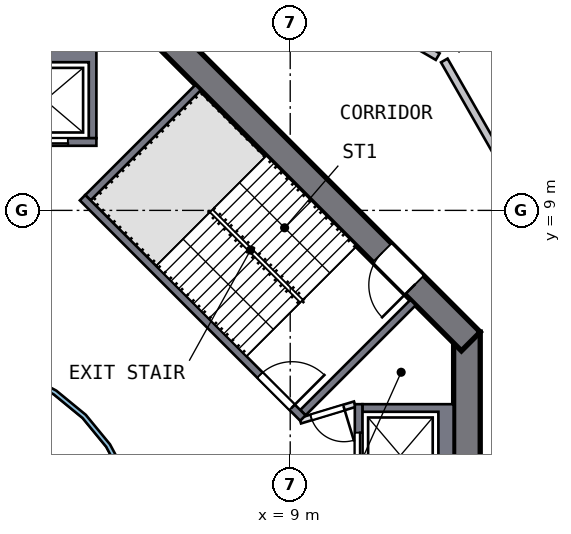
"""IFC4 building model, lengths in metres.
Left out: names, types, materials, properties, quantities, classifications, styles, units other than length and angle.
Written with IfcOpenShell. Run it as: python <this file> out.ifc"""

import sys

from ifc_helpers import new_model, si_unit, direction, frame, frame_2d, origin, place, context, subcontext, project, spatial, polyline, rectangle, outline, extrude, element, fill, save


model = new_model("IFC4")
c1 = context("Model", 3, precision=1e-05, world=origin(), true_north=direction((0.0, 1.0)))
c2 = subcontext(c1, "Body", "Model", "MODEL_VIEW")
j1 = project(units=[si_unit("LENGTHUNIT", "METRE"), si_unit("PLANEANGLEUNIT", "RADIAN")], contexts=[c1])
p1 = place(None, origin())
s1 = spatial("IfcSite", under=j1, at=p1, CompositionType="ELEMENT")
p2 = place(p1, origin())
s2 = spatial("IfcBuilding", under=s1, at=p2, CompositionType="ELEMENT")
p3 = place(p2, frame((0.0, 0.0, 154.0)))
s3 = spatial("IfcBuildingStorey", under=s2, at=p3, CompositionType="ELEMENT", Elevation=154.0)
p4 = place(p3, frame((13.65, -5.799, 0.0), z_axis=(0.0, 0.0, 1.0), x_axis=(0.0, 1.0, 0.0)))
e1 = element("IfcWall", 1, at=p4, inside=s3, PredefinedType="SHEAR", context=c2, shape_type="SweptSolid", body=[
    extrude(rectangle(XDim=11.598, YDim=0.7, at=frame_2d((5.799, 0.0))), origin(), (0.0, 0.0, 1.0), 4.5),
])
p5 = place(p4, frame((4.899, 0.0, 0.0)))
e2 = element("IfcOpeningElement", 2, at=p5, cuts=e1, PredefinedType="OPENING", context=c2, shape_type="SweptSolid", body=[
    extrude(rectangle(XDim=1.8, YDim=2.1, at=frame_2d((0.9, 1.05))), frame((0.0, 0.36, 0.0), z_axis=(0.0, -1.0, 0.0), x_axis=(1.0, 0.0, 0.0)), (0.0, 0.0, 1.0), 0.72),
])
p6 = place(p3, frame((13.752, 5.552, 0.0), z_axis=(0.0, 0.0, 1.0), x_axis=(-0.707106781, 0.707106781, 0.0)))
e3 = element("IfcWall", 3, at=p6, inside=s3, PredefinedType="SHEAR", context=c2, shape_type="SweptSolid", body=[
    extrude(rectangle(XDim=11.598, YDim=0.7, at=frame_2d((5.799, 0.0))), origin(), (0.0, 0.0, 1.0), 4.5),
])
p7 = place(p6, frame((2.099, 0.0, 0.0)))
e4 = element("IfcOpeningElement", 4, at=p7, cuts=e3, PredefinedType="OPENING", context=c2, shape_type="SweptSolid", body=[
    extrude(rectangle(XDim=1.2, YDim=2.1, at=frame_2d((0.6, 1.05))), frame((0.0, 0.36, 0.0), z_axis=(0.0, -1.0, 0.0), x_axis=(1.0, 0.0, 0.0)), (0.0, 0.0, 1.0), 0.72),
])
p8 = place(p3, origin())
e5 = element("IfcWall", 5, at=p8, inside=s3, PredefinedType="SOLIDWALL", context=c2, shape_type="SweptSolid", body=[
    extrude(outline(polyline([(13.3, 3.9), (13.3, 1.2), (10.9, 1.2), (10.9, 1.4), (12.9, 1.4), (12.9, 3.7), (10.9, 3.7), (10.9, 3.9), (13.3, 3.9)])), origin(), (0.0, 0.0, 1.0), 4.19),
])
p9 = place(p3, frame((10.8, 1.2, 0.0), z_axis=(0.0, 0.0, 1.0), x_axis=(0.0, 1.0, 0.0)))
e6 = element("IfcWall", 6, at=p9, inside=s3, PredefinedType="SOLIDWALL", context=c2, shape_type="SweptSolid", body=[
    extrude(rectangle(XDim=2.7, YDim=0.2, at=frame_2d((1.35, 0.0))), origin(), (0.0, 0.0, 1.0), 4.19),
])
p10 = place(p9, frame((0.75, 0.0, 0.0)))
e7 = element("IfcOpeningElement", 7, at=p10, cuts=e6, PredefinedType="OPENING", context=c2, shape_type="SweptSolid", body=[
    extrude(rectangle(XDim=1.2, YDim=2.1, at=frame_2d((0.6, 1.05))), frame((0.0, 0.11, 0.0), z_axis=(0.0, -1.0, 0.0), x_axis=(1.0, 0.0, 0.0)), (0.0, 0.0, 1.0), 0.22),
])
p11 = place(p3, origin())
e8 = element("IfcWall", 8, at=p11, inside=s3, PredefinedType="SOLIDWALL", context=c2, shape_type="SweptSolid", body=[
    extrude(outline(polyline([(3.9, 13.3), (3.9, 10.9), (3.7, 10.9), (3.7, 12.9), (1.4, 12.9), (1.4, 10.9), (1.2, 10.9), (1.2, 13.3), (3.9, 13.3)])), origin(), (0.0, 0.0, 1.0), 4.19),
])
p12 = place(p3, frame((1.2, 10.8, 0.0), z_axis=(0.0, 0.0, 1.0), x_axis=(1.0, 0.0, 0.0)))
e9 = element("IfcWall", 9, at=p12, inside=s3, PredefinedType="SOLIDWALL", context=c2, shape_type="SweptSolid", body=[
    extrude(rectangle(XDim=2.7, YDim=0.2, at=frame_2d((1.35, 0.0))), origin(), (0.0, 0.0, 1.0), 4.19),
])
p13 = place(p12, frame((0.75, 0.0, 0.0)))
e10 = element("IfcOpeningElement", 10, at=p13, cuts=e9, PredefinedType="OPENING", context=c2, shape_type="SweptSolid", body=[
    extrude(rectangle(XDim=1.2, YDim=2.1, at=frame_2d((0.6, 1.05))), frame((0.0, 0.11, 0.0), z_axis=(0.0, -1.0, 0.0), x_axis=(1.0, 0.0, 0.0)), (0.0, 0.0, 1.0), 0.22),
])
p14 = place(p3, frame((3.535, 9.334, 0.0), z_axis=(0.0, 0.0, 1.0), x_axis=(0.707106781, -0.707106781, 0.0)))
e11 = element("IfcWall", 11, at=p14, inside=s3, PredefinedType="SOLIDWALL", context=c2, shape_type="SweptSolid", body=[
    extrude(rectangle(XDim=8.2, YDim=0.2, at=frame_2d((4.1, 0.0))), origin(), (0.0, 0.0, 1.0), 4.19),
])
p15 = place(p14, frame((6.6, 0.0, 0.0)))
e12 = element("IfcOpeningElement", 12, at=p15, cuts=e11, PredefinedType="OPENING", context=c2, shape_type="SweptSolid", body=[
    extrude(rectangle(XDim=1.2, YDim=2.1, at=frame_2d((0.6, 1.05))), frame((0.0, 0.11, 0.0), z_axis=(0.0, -1.0, 0.0), x_axis=(1.0, 0.0, 0.0)), (0.0, 0.0, 1.0), 0.22),
])
for number, where, z_axis, x_axis in (
    (13, (9.334, 3.677, 0.0), (0.0, 0.0, 1.0), (0.707, 0.707, 0.0)),
    (14, (3.677, 9.334, 0.0), (0.0, 0.0, 1.0), (0.707, 0.707, 0.0)),
):
    element("IfcWall", number, at=place(p3, frame(where, z_axis=z_axis, x_axis=x_axis)), inside=s3, PredefinedType="SOLIDWALL", context=c2, shape_type="SweptSolid", body=[
        extrude(rectangle(XDim=4.1, YDim=0.2, at=frame_2d((2.05, 0.0))), origin(), (0.0, 0.0, 1.0), 4.19),
    ])
p16 = place(p3, frame((10.7, 3.9, 0.0), z_axis=(0.0, 0.0, 1.0), x_axis=(-0.957084567, -0.289808785, 0.0)))
e15 = element("IfcWall", 15, at=p16, inside=s3, PredefinedType="PARTITIONING", context=c2, shape_type="SweptSolid", body=[
    extrude(rectangle(XDim=1.501, YDim=0.15, at=frame_2d((0.75, 0.0))), origin(), (0.0, 0.0, 1.0), 4.19),
])
p17 = place(p16, frame((0.301, 0.0, 0.0)))
e16 = element("IfcOpeningElement", 16, at=p17, cuts=e15, PredefinedType="OPENING", context=c2, shape_type="SweptSolid", body=[
    extrude(rectangle(XDim=0.9, YDim=2.1, at=frame_2d((0.45, 1.05))), frame((0.0, 0.085, 0.0), z_axis=(0.0, -1.0, 0.0), x_axis=(1.0, 0.0, 0.0)), (0.0, 0.0, 1.0), 0.17),
])
p18 = place(p3, origin())
e17 = element("IfcWall", 17, at=p18, inside=s3, PredefinedType="SOLIDWALL", context=c2, shape_type="SweptSolid", body=[
    extrude(outline(polyline([(5.021, -0.999), (4.73, -1.959), (4.257, -2.844), (3.62, -3.62), (2.844, -4.257), (1.959, -4.73), (0.999, -5.021), (0.0, -5.12), (-0.999, -5.021), (-1.959, -4.73), (-2.844, -4.257), (-3.62, -3.62), (-4.257, -2.844), (-4.73, -1.959), (-5.021, -0.999), (-5.12, 0.0), (-5.021, 0.999), (-4.73, 1.959), (-4.257, 2.844), (-3.62, 3.62), (-2.844, 4.257), (-1.959, 4.73), (-0.999, 5.021), (0.0, 5.12), (0.999, 5.021), (1.959, 4.73), (2.844, 4.257), (3.62, 3.62), (4.257, 2.844), (4.73, 1.959), (5.021, 0.999), (5.12, 0.0), (5.021, -0.999)]), holes=[polyline([(4.904, 0.976), (4.619, 1.913), (4.157, 2.778), (3.535, 3.535), (2.778, 4.157), (1.913, 4.619), (0.976, 4.904), (0.0, 5.0), (-0.976, 4.904), (-1.913, 4.619), (-2.778, 4.157), (-3.535, 3.535), (-4.157, 2.778), (-4.619, 1.913), (-4.904, 0.976), (-5.0, 0.0), (-4.904, -0.976), (-4.619, -1.913), (-4.157, -2.778), (-3.535, -3.535), (-2.778, -4.157), (-1.913, -4.619), (-0.976, -4.904), (0.0, -5.0), (0.976, -4.904), (1.913, -4.619), (2.778, -4.157), (3.535, -3.535), (4.157, -2.778), (4.619, -1.913), (4.904, -0.976), (5.0, 0.0), (4.904, 0.976)])]), origin(), (0.0, 0.0, 1.0), 4.19),
])
p19 = place(p3, frame((4.833, 17.738, 0.0), z_axis=(0.0, 0.0, 1.0), x_axis=(0.863919531, -0.503629868, 0.0)))
e18 = element("IfcWall", 18, at=p19, inside=s3, PredefinedType="SOLIDWALL", context=c2, shape_type="SweptSolid", body=[
    extrude(rectangle(XDim=9.317, YDim=0.2, at=frame_2d((4.658, 0.0))), origin(), (0.0, 0.0, 1.0), 4.19),
])
p20 = place(p19, frame((5.15, 0.0, 0.0)))
e19 = element("IfcOpeningElement", 19, at=p20, cuts=e18, PredefinedType="OPENING", context=c2, shape_type="SweptSolid", body=[
    extrude(rectangle(XDim=1.0, YDim=2.1, at=frame_2d((0.5, 1.05))), frame((0.0, 0.11, 0.0), z_axis=(0.0, -1.0, 0.0), x_axis=(1.0, 0.0, 0.0)), (0.0, 0.0, 1.0), 0.22),
])
p21 = place(p3, frame((13.054, 12.945, 0.0), z_axis=(0.0, 0.0, 1.0), x_axis=(0.496359944, -0.868116816, 0.0)))
e20 = element("IfcWall", 20, at=p21, inside=s3, PredefinedType="SOLIDWALL", context=c2, shape_type="SweptSolid", body=[
    extrude(rectangle(XDim=9.517, YDim=0.2, at=frame_2d((4.758, 0.0))), origin(), (0.0, 0.0, 1.0), 4.19),
])
p22 = place(p21, frame((6.25, 0.0, 0.0)))
e21 = element("IfcOpeningElement", 21, at=p22, cuts=e20, PredefinedType="OPENING", context=c2, shape_type="SweptSolid", body=[
    extrude(rectangle(XDim=1.8, YDim=2.1, at=frame_2d((0.9, 1.05))), frame((0.0, 0.11, 0.0), z_axis=(0.0, -1.0, 0.0), x_axis=(1.0, 0.0, 0.0)), (0.0, 0.0, 1.0), 0.22),
])
p23 = place(p10, origin())
e22 = element("IfcDoor", 22, at=p23, inside=s3, OperationType="DOUBLE_DOOR_SLIDING", PredefinedType="DOOR", context=c2, shape_type="SweptSolid", body=[
    extrude(rectangle(XDim=1.2, YDim=2.1, at=frame_2d((0.6, 1.05))), frame((0.0, 0.025, 0.0), z_axis=(0.0, -1.0, 0.0), x_axis=(1.0, 0.0, 0.0)), (0.0, 0.0, 1.0), 0.05),
])
fill(e7, e22)
p24 = place(p13, origin())
e23 = element("IfcDoor", 23, at=p24, inside=s3, OperationType="DOUBLE_DOOR_SLIDING", PredefinedType="DOOR", context=c2, shape_type="SweptSolid", body=[
    extrude(rectangle(XDim=1.2, YDim=2.1, at=frame_2d((0.6, 1.05))), frame((0.0, 0.025, 0.0), z_axis=(0.0, -1.0, 0.0), x_axis=(1.0, 0.0, 0.0)), (0.0, 0.0, 1.0), 0.05),
])
fill(e10, e23)
p25 = place(p15, origin())
e24 = element("IfcDoor", 24, at=p25, inside=s3, OperationType="SINGLE_SWING_RIGHT", PredefinedType="DOOR", context=c2, shape_type="SweptSolid", body=[
    extrude(rectangle(XDim=1.2, YDim=2.1, at=frame_2d((0.6, 1.05))), frame((0.0, 0.025, 0.0), z_axis=(0.0, -1.0, 0.0), x_axis=(1.0, 0.0, 0.0)), (0.0, 0.0, 1.0), 0.05),
])
fill(e12, e24)
p26 = place(p7, origin())
e25 = element("IfcDoor", 25, at=p26, inside=s3, OperationType="SINGLE_SWING_LEFT", PredefinedType="DOOR", context=c2, shape_type="SweptSolid", body=[
    extrude(rectangle(XDim=1.2, YDim=2.1, at=frame_2d((0.6, 1.05))), frame((0.0, 0.025, 0.0), z_axis=(0.0, -1.0, 0.0), x_axis=(1.0, 0.0, 0.0)), (0.0, 0.0, 1.0), 0.05),
])
fill(e4, e25)
p27 = place(p17, origin())
e26 = element("IfcDoor", 26, at=p27, inside=s3, OperationType="SINGLE_SWING_LEFT", PredefinedType="DOOR", context=c2, shape_type="SweptSolid", body=[
    extrude(rectangle(XDim=0.9, YDim=2.1, at=frame_2d((0.45, 1.05))), frame((0.0, 0.025, 0.0), z_axis=(0.0, -1.0, 0.0), x_axis=(1.0, 0.0, 0.0)), (0.0, 0.0, 1.0), 0.05),
])
fill(e16, e26)
save(model, sys.argv[1])
